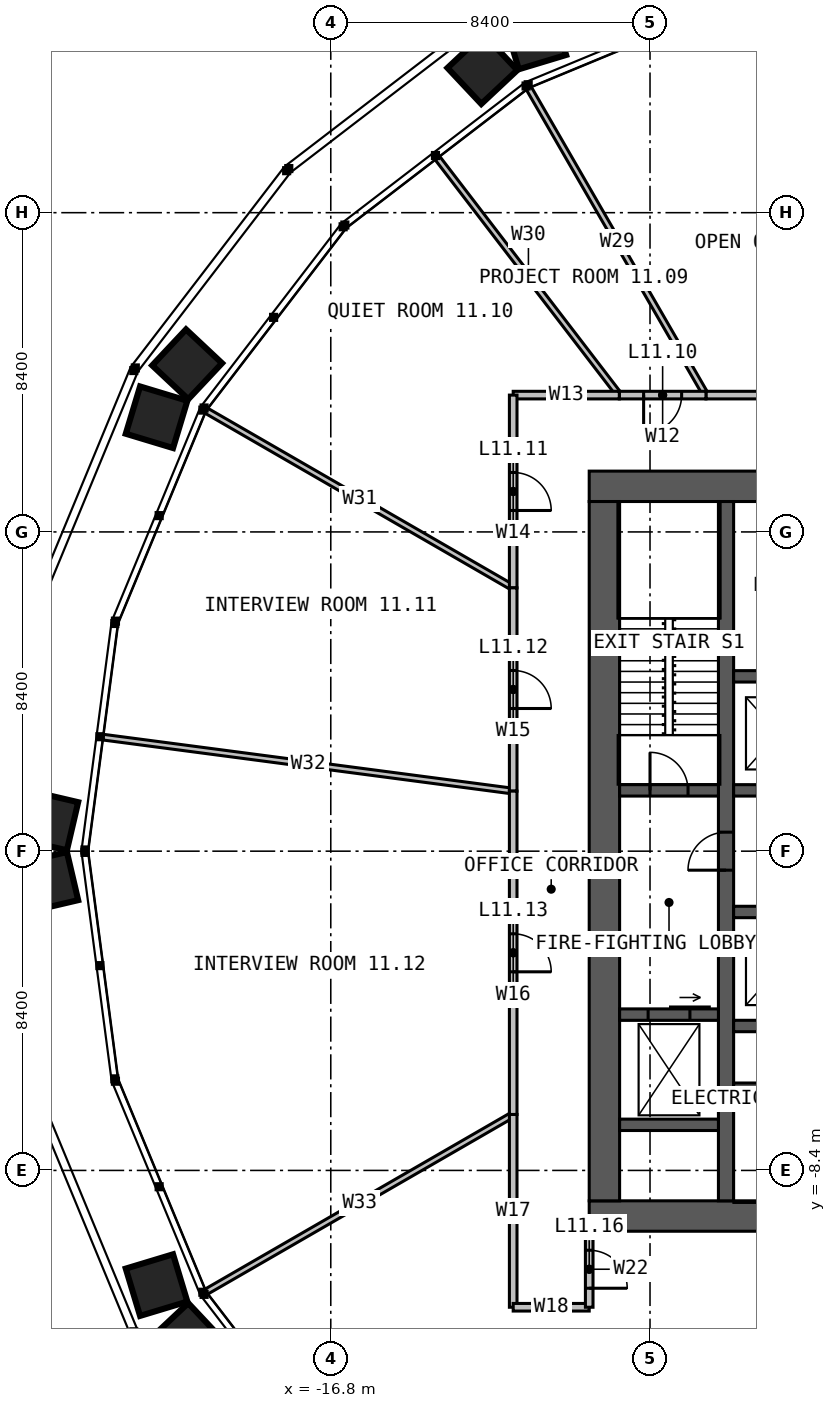
"""IFC4 building model, lengths in metres.
Left out: names, types, materials, properties, quantities, classifications, styles, units other than length and angle.
Written with IfcOpenShell. Run it as: python <this file> out.ifc"""

import sys

from ifc_helpers import new_model, si_unit, direction, frame, frame_2d, origin, place, context, subcontext, project, spatial, rectangle, extrude, element, fill, save


model = new_model("IFC4")
c1 = context("Model", 3, precision=1e-05, world=origin(), true_north=direction((0.0, 1.0)))
c2 = subcontext(c1, "Body", "Model", "MODEL_VIEW")
j1 = project(units=[si_unit("LENGTHUNIT", "METRE"), si_unit("PLANEANGLEUNIT", "RADIAN")], contexts=[c1])
p1 = place(None, origin())
s1 = spatial("IfcSite", under=j1, at=p1, CompositionType="ELEMENT")
p2 = place(p1, origin())
s2 = spatial("IfcBuilding", under=s1, at=p2, CompositionType="ELEMENT")
p3 = place(p2, frame((0.0, 0.0, 49.0)))
s3 = spatial("IfcBuildingStorey", under=s2, at=p3, CompositionType="ELEMENT", Elevation=49.0)
p4 = place(p3, frame((-10.0, 9.6, 0.0), z_axis=(0.0, 0.0, 1.0), x_axis=(1.0, 0.0, 0.0)))
e1 = element("IfcWall", 1, at=p4, inside=s3, PredefinedType="SOLIDWALL", context=c2, shape_type="SweptSolid", body=[
    extrude(rectangle(XDim=20.0, YDim=0.8, at=frame_2d((10.0, 0.0))), origin(), (0.0, 0.0, 1.0), 4.0),
])
p5 = place(p4, frame((9.4, 0.0, 0.0)))
e2 = element("IfcOpeningElement", 2, at=p5, cuts=e1, PredefinedType="OPENING", context=c2, shape_type="SweptSolid", body=[
    extrude(rectangle(XDim=1.2, YDim=2.2, at=frame_2d((0.6, 1.1))), frame((0.0, 0.41, 0.0), z_axis=(0.0, -1.0, 0.0), x_axis=(1.0, 0.0, 0.0)), (0.0, 0.0, 1.0), 0.82),
])
p6 = place(p3, frame((10.0, -9.6, 0.0), z_axis=(0.0, 0.0, 1.0), x_axis=(-1.0, 0.0, 0.0)))
e3 = element("IfcWall", 3, at=p6, inside=s3, PredefinedType="SOLIDWALL", context=c2, shape_type="SweptSolid", body=[
    extrude(rectangle(XDim=20.0, YDim=0.8, at=frame_2d((10.0, 0.0))), origin(), (0.0, 0.0, 1.0), 4.0),
])
p7 = place(p6, frame((6.875, 0.0, 0.0)))
e4 = element("IfcOpeningElement", 4, at=p7, cuts=e3, PredefinedType="OPENING", context=c2, shape_type="SweptSolid", body=[
    extrude(rectangle(XDim=1.2, YDim=2.2, at=frame_2d((0.6, 1.1))), frame((0.0, 0.41, 0.0), z_axis=(0.0, -1.0, 0.0), x_axis=(1.0, 0.0, 0.0)), (0.0, 0.0, 1.0), 0.82),
])
p8 = place(p3, frame((-9.6, 9.2, 0.0), z_axis=(0.0, 0.0, 1.0), x_axis=(0.0, -1.0, 0.0)))
e5 = element("IfcWall", 5, at=p8, inside=s3, PredefinedType="SOLIDWALL", context=c2, shape_type="SweptSolid", body=[
    extrude(rectangle(XDim=18.4, YDim=0.8, at=frame_2d((9.2, 0.0))), origin(), (0.0, 0.0, 1.0), 4.0),
])
p9 = place(p3, frame((-6.4, -9.2, 0.0), z_axis=(0.0, 0.0, 1.0), x_axis=(0.0, 1.0, 0.0)))
e6 = element("IfcWall", 6, at=p9, inside=s3, PredefinedType="SOLIDWALL", context=c2, shape_type="SweptSolid", body=[
    extrude(rectangle(XDim=18.4, YDim=0.4, at=frame_2d((9.2, 0.0))), origin(), (0.0, 0.0, 1.0), 4.0),
])
p10 = place(p9, frame((8.7, 0.0, 0.0)))
e7 = element("IfcOpeningElement", 7, at=p10, cuts=e6, PredefinedType="OPENING", context=c2, shape_type="SweptSolid", body=[
    extrude(rectangle(XDim=1.0, YDim=2.2, at=frame_2d((0.5, 1.1))), frame((0.0, 0.21, 0.0), z_axis=(0.0, -1.0, 0.0), x_axis=(1.0, 0.0, 0.0)), (0.0, 0.0, 1.0), 0.42),
])
p11 = place(p3, frame((-6.2, 1.6, 0.0), z_axis=(0.0, 0.0, 1.0), x_axis=(1.0, 0.0, 0.0)))
e8 = element("IfcWall", 8, at=p11, inside=s3, PredefinedType="SOLIDWALL", context=c2, shape_type="SweptSolid", body=[
    extrude(rectangle(XDim=4.85, YDim=0.3, at=frame_2d((2.425, 0.0))), origin(), (0.0, 0.0, 1.0), 4.0),
])
p12 = place(p11, frame((0.625, 0.0, 0.0)))
e9 = element("IfcOpeningElement", 9, at=p12, cuts=e8, PredefinedType="OPENING", context=c2, shape_type="SweptSolid", body=[
    extrude(rectangle(XDim=1.1, YDim=2.2, at=frame_2d((0.55, 1.1))), frame((0.0, 0.16, 0.0), z_axis=(0.0, -1.0, 0.0), x_axis=(1.0, 0.0, 0.0)), (0.0, 0.0, 1.0), 0.32),
])
p13 = place(p11, frame((3.15, 0.0, 0.0)))
e10 = element("IfcOpeningElement", 10, at=p13, cuts=e8, PredefinedType="OPENING", context=c2, shape_type="SweptSolid", body=[
    extrude(rectangle(XDim=1.1, YDim=2.2, at=frame_2d((0.55, 1.1))), frame((0.0, 0.16, 0.0), z_axis=(0.0, -1.0, 0.0), x_axis=(1.0, 0.0, 0.0)), (0.0, 0.0, 1.0), 0.32),
])
p14 = place(p3, frame((-6.2, 4.6, 0.0), z_axis=(0.0, 0.0, 1.0), x_axis=(1.0, 0.0, 0.0)))
e11 = element("IfcWall", 11, at=p14, inside=s3, PredefinedType="SOLIDWALL", context=c2, shape_type="SweptSolid", body=[
    extrude(rectangle(XDim=4.85, YDim=0.3, at=frame_2d((2.425, 0.0))), origin(), (0.0, 0.0, 1.0), 4.0),
])
for number, where, z_axis, x_axis in (
    (12, (-6.2, -1.6, 0.0), (0.0, 0.0, 1.0), (1.0, 0.0, 0.0)),
    (13, (-6.2, -4.6, 0.0), (0.0, 0.0, 1.0), (1.0, 0.0, 0.0)),
):
    element("IfcWall", number, at=place(p3, frame(where, z_axis=z_axis, x_axis=x_axis)), inside=s3, PredefinedType="SOLIDWALL", context=c2, shape_type="SweptSolid", body=[
        extrude(rectangle(XDim=7.4, YDim=0.3, at=frame_2d((3.7, 0.0))), origin(), (0.0, 0.0, 1.0), 4.0),
    ])
p15 = place(p3, frame((-6.2, -6.2, 0.0), z_axis=(0.0, 0.0, 1.0), x_axis=(1.0, 0.0, 0.0)))
e14 = element("IfcWall", 14, at=p15, inside=s3, PredefinedType="SOLIDWALL", context=c2, shape_type="SweptSolid", body=[
    extrude(rectangle(XDim=7.4, YDim=0.2, at=frame_2d((3.7, 0.0))), origin(), (0.0, 0.0, 1.0), 4.0),
])
p16 = place(p3, frame((-9.2, 1.6, 0.0), z_axis=(0.0, 0.0, 1.0), x_axis=(1.0, 0.0, 0.0)))
e15 = element("IfcWall", 15, at=p16, inside=s3, PredefinedType="SOLIDWALL", context=c2, shape_type="SweptSolid", body=[
    extrude(rectangle(XDim=2.6, YDim=0.3, at=frame_2d((1.3, 0.0))), origin(), (0.0, 0.0, 1.0), 4.0),
])
p17 = place(p16, frame((0.8, 0.0, 0.0)))
e16 = element("IfcOpeningElement", 16, at=p17, cuts=e15, PredefinedType="OPENING", context=c2, shape_type="SweptSolid", body=[
    extrude(rectangle(XDim=1.0, YDim=2.2, at=frame_2d((0.5, 1.1))), frame((0.0, 0.16, 0.0), z_axis=(0.0, -1.0, 0.0), x_axis=(1.0, 0.0, 0.0)), (0.0, 0.0, 1.0), 0.32),
])
p18 = place(p3, frame((-9.2, -4.3, 0.0), z_axis=(0.0, 0.0, 1.0), x_axis=(1.0, 0.0, 0.0)))
e17 = element("IfcWall", 17, at=p18, inside=s3, PredefinedType="SOLIDWALL", context=c2, shape_type="SweptSolid", body=[
    extrude(rectangle(XDim=2.6, YDim=0.3, at=frame_2d((1.3, 0.0))), origin(), (0.0, 0.0, 1.0), 4.0),
])
p19 = place(p18, frame((0.75, 0.0, 0.0)))
e18 = element("IfcOpeningElement", 18, at=p19, cuts=e17, PredefinedType="OPENING", context=c2, shape_type="SweptSolid", body=[
    extrude(rectangle(XDim=1.1, YDim=2.2, at=frame_2d((0.55, 1.1))), frame((0.0, 0.16, 0.0), z_axis=(0.0, -1.0, 0.0), x_axis=(1.0, 0.0, 0.0)), (0.0, 0.0, 1.0), 0.32),
])
p20 = place(p3, frame((-9.2, -7.2, 0.0), z_axis=(0.0, 0.0, 1.0), x_axis=(1.0, 0.0, 0.0)))
e19 = element("IfcWall", 19, at=p20, inside=s3, PredefinedType="SOLIDWALL", context=c2, shape_type="SweptSolid", body=[
    extrude(rectangle(XDim=2.6, YDim=0.3, at=frame_2d((1.3, 0.0))), origin(), (0.0, 0.0, 1.0), 4.0),
])
p21 = place(p3, frame((-6.928, 12.0, 0.0), z_axis=(0.0, 0.0, 1.0), x_axis=(-0.499994446179, 0.866028610261, 0.0)))
e20 = element("IfcWall", 20, at=p21, inside=s3, PredefinedType="PARTITIONING", context=c2, shape_type="SweptSolid", body=[
    extrude(rectangle(XDim=9.324, YDim=0.15, at=frame_2d((4.662, 0.0))), origin(), (0.0, 0.0, 1.0), 2.79),
])
p22 = place(p3, frame((-9.208, 12.0, 0.0), z_axis=(0.0, 0.0, 1.0), x_axis=(-0.60875965539, 0.793354701233, 0.0)))
e21 = element("IfcWall", 21, at=p22, inside=s3, PredefinedType="PARTITIONING", context=c2, shape_type="SweptSolid", body=[
    extrude(rectangle(XDim=7.856, YDim=0.15, at=frame_2d((3.928, 0.0))), origin(), (0.0, 0.0, 1.0), 2.79),
])
p23 = place(p3, frame((-12.0, 6.928, 0.0), z_axis=(0.0, 0.0, 1.0), x_axis=(-0.866028610261, 0.499994446179, 0.0)))
e22 = element("IfcWall", 22, at=p23, inside=s3, PredefinedType="PARTITIONING", context=c2, shape_type="SweptSolid", body=[
    extrude(rectangle(XDim=9.324, YDim=0.15, at=frame_2d((4.662, 0.0))), origin(), (0.0, 0.0, 1.0), 2.79),
])
p24 = place(p3, frame((-12.0, 1.58, 0.0), z_axis=(0.0, 0.0, 1.0), x_axis=(-0.991444897346, 0.130525918984, 0.0)))
e23 = element("IfcWall", 23, at=p24, inside=s3, PredefinedType="PARTITIONING", context=c2, shape_type="SweptSolid", body=[
    extrude(rectangle(XDim=10.878, YDim=0.15, at=frame_2d((5.439, 0.0))), origin(), (0.0, 0.0, 1.0), 2.79),
])
p25 = place(p3, frame((-12.0, -6.928, 0.0), z_axis=(0.0, 0.0, 1.0), x_axis=(-0.866028610261, -0.499994446179, 0.0)))
e24 = element("IfcWall", 24, at=p25, inside=s3, PredefinedType="PARTITIONING", context=c2, shape_type="SweptSolid", body=[
    extrude(rectangle(XDim=9.324, YDim=0.15, at=frame_2d((4.662, 0.0))), origin(), (0.0, 0.0, 1.0), 2.79),
])
p26 = place(p3, frame((0.0, 12.0, 0.0), z_axis=(0.0, 0.0, 1.0), x_axis=(-1.0, 0.0, 0.0)))
e25 = element("IfcWall", 25, at=p26, inside=s3, PredefinedType="PARTITIONING", context=c2, shape_type="SweptSolid", body=[
    extrude(rectangle(XDim=6.928, YDim=0.2, at=frame_2d((3.464, 0.0))), origin(), (0.0, 0.0, 1.0), 3.8),
])
p27 = place(p26, frame((2.564, 0.0, 0.0)))
e26 = element("IfcOpeningElement", 26, at=p27, cuts=e25, PredefinedType="OPENING", context=c2, shape_type="SweptSolid", body=[
    extrude(rectangle(XDim=1.8, YDim=2.2, at=frame_2d((0.9, 1.1))), frame((0.0, 0.11, 0.0), z_axis=(0.0, -1.0, 0.0), x_axis=(1.0, 0.0, 0.0)), (0.0, 0.0, 1.0), 0.22),
])
p28 = place(p3, frame((-6.928, 12.0, 0.0), z_axis=(0.0, 0.0, 1.0), x_axis=(-1.0, 0.0, 0.0)))
e27 = element("IfcWall", 27, at=p28, inside=s3, PredefinedType="PARTITIONING", context=c2, shape_type="SweptSolid", body=[
    extrude(rectangle(XDim=2.28, YDim=0.2, at=frame_2d((1.14, 0.0))), origin(), (0.0, 0.0, 1.0), 3.8),
])
p29 = place(p28, frame((0.64, 0.0, 0.0)))
e28 = element("IfcOpeningElement", 28, at=p29, cuts=e27, PredefinedType="OPENING", context=c2, shape_type="SweptSolid", body=[
    extrude(rectangle(XDim=1.0, YDim=2.2, at=frame_2d((0.5, 1.1))), frame((0.0, 0.11, 0.0), z_axis=(0.0, -1.0, 0.0), x_axis=(1.0, 0.0, 0.0)), (0.0, 0.0, 1.0), 0.22),
])
p30 = place(p3, frame((-9.208, 12.0, 0.0), z_axis=(0.0, 0.0, 1.0), x_axis=(-1.0, 0.0, 0.0)))
e29 = element("IfcWall", 29, at=p30, inside=s3, PredefinedType="PARTITIONING", context=c2, shape_type="SweptSolid", body=[
    extrude(rectangle(XDim=2.792, YDim=0.2, at=frame_2d((1.396, 0.0))), origin(), (0.0, 0.0, 1.0), 3.8),
])
p31 = place(p3, frame((-12.0, 12.0, 0.0), z_axis=(0.0, 0.0, 1.0), x_axis=(0.0, -1.0, 0.0)))
e30 = element("IfcWall", 30, at=p31, inside=s3, PredefinedType="PARTITIONING", context=c2, shape_type="SweptSolid", body=[
    extrude(rectangle(XDim=5.072, YDim=0.2, at=frame_2d((2.536, 0.0))), origin(), (0.0, 0.0, 1.0), 3.8),
])
p32 = place(p31, frame((2.036, 0.0, 0.0)))
e31 = element("IfcOpeningElement", 31, at=p32, cuts=e30, PredefinedType="OPENING", context=c2, shape_type="SweptSolid", body=[
    extrude(rectangle(XDim=1.0, YDim=2.2, at=frame_2d((0.5, 1.1))), frame((0.0, 0.11, 0.0), z_axis=(0.0, -1.0, 0.0), x_axis=(1.0, 0.0, 0.0)), (0.0, 0.0, 1.0), 0.22),
])
p33 = place(p3, frame((-12.0, 6.928, 0.0), z_axis=(0.0, 0.0, 1.0), x_axis=(0.0, -1.0, 0.0)))
e32 = element("IfcWall", 32, at=p33, inside=s3, PredefinedType="PARTITIONING", context=c2, shape_type="SweptSolid", body=[
    extrude(rectangle(XDim=5.348, YDim=0.2, at=frame_2d((2.674, 0.0))), origin(), (0.0, 0.0, 1.0), 3.8),
])
p34 = place(p33, frame((2.174, 0.0, 0.0)))
e33 = element("IfcOpeningElement", 33, at=p34, cuts=e32, PredefinedType="OPENING", context=c2, shape_type="SweptSolid", body=[
    extrude(rectangle(XDim=1.0, YDim=2.2, at=frame_2d((0.5, 1.1))), frame((0.0, 0.11, 0.0), z_axis=(0.0, -1.0, 0.0), x_axis=(1.0, 0.0, 0.0)), (0.0, 0.0, 1.0), 0.22),
])
p35 = place(p3, frame((-12.0, 1.58, 0.0), z_axis=(0.0, 0.0, 1.0), x_axis=(0.0, -1.0, 0.0)))
e34 = element("IfcWall", 34, at=p35, inside=s3, PredefinedType="PARTITIONING", context=c2, shape_type="SweptSolid", body=[
    extrude(rectangle(XDim=8.508, YDim=0.2, at=frame_2d((4.254, 0.0))), origin(), (0.0, 0.0, 1.0), 3.8),
])
p36 = place(p35, frame((3.754, 0.0, 0.0)))
e35 = element("IfcOpeningElement", 35, at=p36, cuts=e34, PredefinedType="OPENING", context=c2, shape_type="SweptSolid", body=[
    extrude(rectangle(XDim=1.0, YDim=2.2, at=frame_2d((0.5, 1.1))), frame((0.0, 0.11, 0.0), z_axis=(0.0, -1.0, 0.0), x_axis=(1.0, 0.0, 0.0)), (0.0, 0.0, 1.0), 0.22),
])
p37 = place(p3, frame((-12.0, -6.928, 0.0), z_axis=(0.0, 0.0, 1.0), x_axis=(0.0, -1.0, 0.0)))
e36 = element("IfcWall", 36, at=p37, inside=s3, PredefinedType="PARTITIONING", context=c2, shape_type="SweptSolid", body=[
    extrude(rectangle(XDim=5.072, YDim=0.2, at=frame_2d((2.536, 0.0))), origin(), (0.0, 0.0, 1.0), 3.8),
])
p38 = place(p3, frame((-12.0, -12.0, 0.0), z_axis=(0.0, 0.0, 1.0), x_axis=(1.0, 0.0, 0.0)))
e37 = element("IfcWall", 37, at=p38, inside=s3, PredefinedType="PARTITIONING", context=c2, shape_type="SweptSolid", body=[
    extrude(rectangle(XDim=2.0, YDim=0.2, at=frame_2d((1.0, 0.0))), origin(), (0.0, 0.0, 1.0), 3.8),
])
p39 = place(p3, frame((-10.0, -10.0, 0.0), z_axis=(0.0, 0.0, 1.0), x_axis=(0.0, -1.0, 0.0)))
e38 = element("IfcWall", 38, at=p39, inside=s3, PredefinedType="PARTITIONING", context=c2, shape_type="SweptSolid", body=[
    extrude(rectangle(XDim=2.0, YDim=0.2, at=frame_2d((1.0, 0.0))), origin(), (0.0, 0.0, 1.0), 3.8),
])
p40 = place(p39, frame((0.5, 0.0, 0.0)))
e39 = element("IfcOpeningElement", 39, at=p40, cuts=e38, PredefinedType="OPENING", context=c2, shape_type="SweptSolid", body=[
    extrude(rectangle(XDim=1.0, YDim=2.2, at=frame_2d((0.5, 1.1))), frame((0.0, 0.11, 0.0), z_axis=(0.0, -1.0, 0.0), x_axis=(1.0, 0.0, 0.0)), (0.0, 0.0, 1.0), 0.22),
])
p41 = place(p10, origin())
e40 = element("IfcDoor", 40, at=p41, inside=s3, OperationType="SINGLE_SWING_LEFT", PredefinedType="DOOR", context=c2, shape_type="SweptSolid", body=[
    extrude(rectangle(XDim=1.0, YDim=2.2, at=frame_2d((0.5, 1.1))), frame((0.0, 0.025, 0.0), z_axis=(0.0, -1.0, 0.0), x_axis=(1.0, 0.0, 0.0)), (0.0, 0.0, 1.0), 0.05),
])
fill(e7, e40)
p42 = place(p17, origin())
e41 = element("IfcDoor", 41, at=p42, inside=s3, OperationType="SINGLE_SWING_LEFT", PredefinedType="DOOR", context=c2, shape_type="SweptSolid", body=[
    extrude(rectangle(XDim=1.0, YDim=2.2, at=frame_2d((0.5, 1.1))), frame((0.0, 0.025, 0.0), z_axis=(0.0, -1.0, 0.0), x_axis=(1.0, 0.0, 0.0)), (0.0, 0.0, 1.0), 0.05),
])
fill(e16, e41)
p43 = place(p19, origin())
e42 = element("IfcDoor", 42, at=p43, inside=s3, OperationType="SLIDING_TO_LEFT", PredefinedType="DOOR", context=c2, shape_type="SweptSolid", body=[
    extrude(rectangle(XDim=1.1, YDim=2.2, at=frame_2d((0.55, 1.1))), frame((0.0, 0.025, 0.0), z_axis=(0.0, -1.0, 0.0), x_axis=(1.0, 0.0, 0.0)), (0.0, 0.0, 1.0), 0.05),
])
fill(e18, e42)
p44 = place(p29, origin())
e43 = element("IfcDoor", 43, at=p44, inside=s3, OperationType="SINGLE_SWING_RIGHT", PredefinedType="DOOR", context=c2, shape_type="SweptSolid", body=[
    extrude(rectangle(XDim=1.0, YDim=2.2, at=frame_2d((0.5, 1.1))), frame((0.0, 0.025, 0.0), z_axis=(0.0, -1.0, 0.0), x_axis=(1.0, 0.0, 0.0)), (0.0, 0.0, 1.0), 0.05),
])
fill(e28, e43)
p45 = place(p32, origin())
e44 = element("IfcDoor", 44, at=p45, inside=s3, OperationType="SINGLE_SWING_RIGHT", PredefinedType="DOOR", context=c2, shape_type="SweptSolid", body=[
    extrude(rectangle(XDim=1.0, YDim=2.2, at=frame_2d((0.5, 1.1))), frame((0.0, 0.025, 0.0), z_axis=(0.0, -1.0, 0.0), x_axis=(1.0, 0.0, 0.0)), (0.0, 0.0, 1.0), 0.05),
])
fill(e31, e44)
p46 = place(p34, origin())
e45 = element("IfcDoor", 45, at=p46, inside=s3, OperationType="SINGLE_SWING_RIGHT", PredefinedType="DOOR", context=c2, shape_type="SweptSolid", body=[
    extrude(rectangle(XDim=1.0, YDim=2.2, at=frame_2d((0.5, 1.1))), frame((0.0, 0.025, 0.0), z_axis=(0.0, -1.0, 0.0), x_axis=(1.0, 0.0, 0.0)), (0.0, 0.0, 1.0), 0.05),
])
fill(e33, e45)
p47 = place(p36, origin())
e46 = element("IfcDoor", 46, at=p47, inside=s3, OperationType="SINGLE_SWING_RIGHT", PredefinedType="DOOR", context=c2, shape_type="SweptSolid", body=[
    extrude(rectangle(XDim=1.0, YDim=2.2, at=frame_2d((0.5, 1.1))), frame((0.0, 0.025, 0.0), z_axis=(0.0, -1.0, 0.0), x_axis=(1.0, 0.0, 0.0)), (0.0, 0.0, 1.0), 0.05),
])
fill(e35, e46)
p48 = place(p40, origin())
e47 = element("IfcDoor", 47, at=p48, inside=s3, OperationType="SINGLE_SWING_RIGHT", PredefinedType="DOOR", context=c2, shape_type="SweptSolid", body=[
    extrude(rectangle(XDim=1.0, YDim=2.2, at=frame_2d((0.5, 1.1))), frame((0.0, 0.025, 0.0), z_axis=(0.0, -1.0, 0.0), x_axis=(1.0, 0.0, 0.0)), (0.0, 0.0, 1.0), 0.05),
])
fill(e39, e47)
save(model, sys.argv[1])
